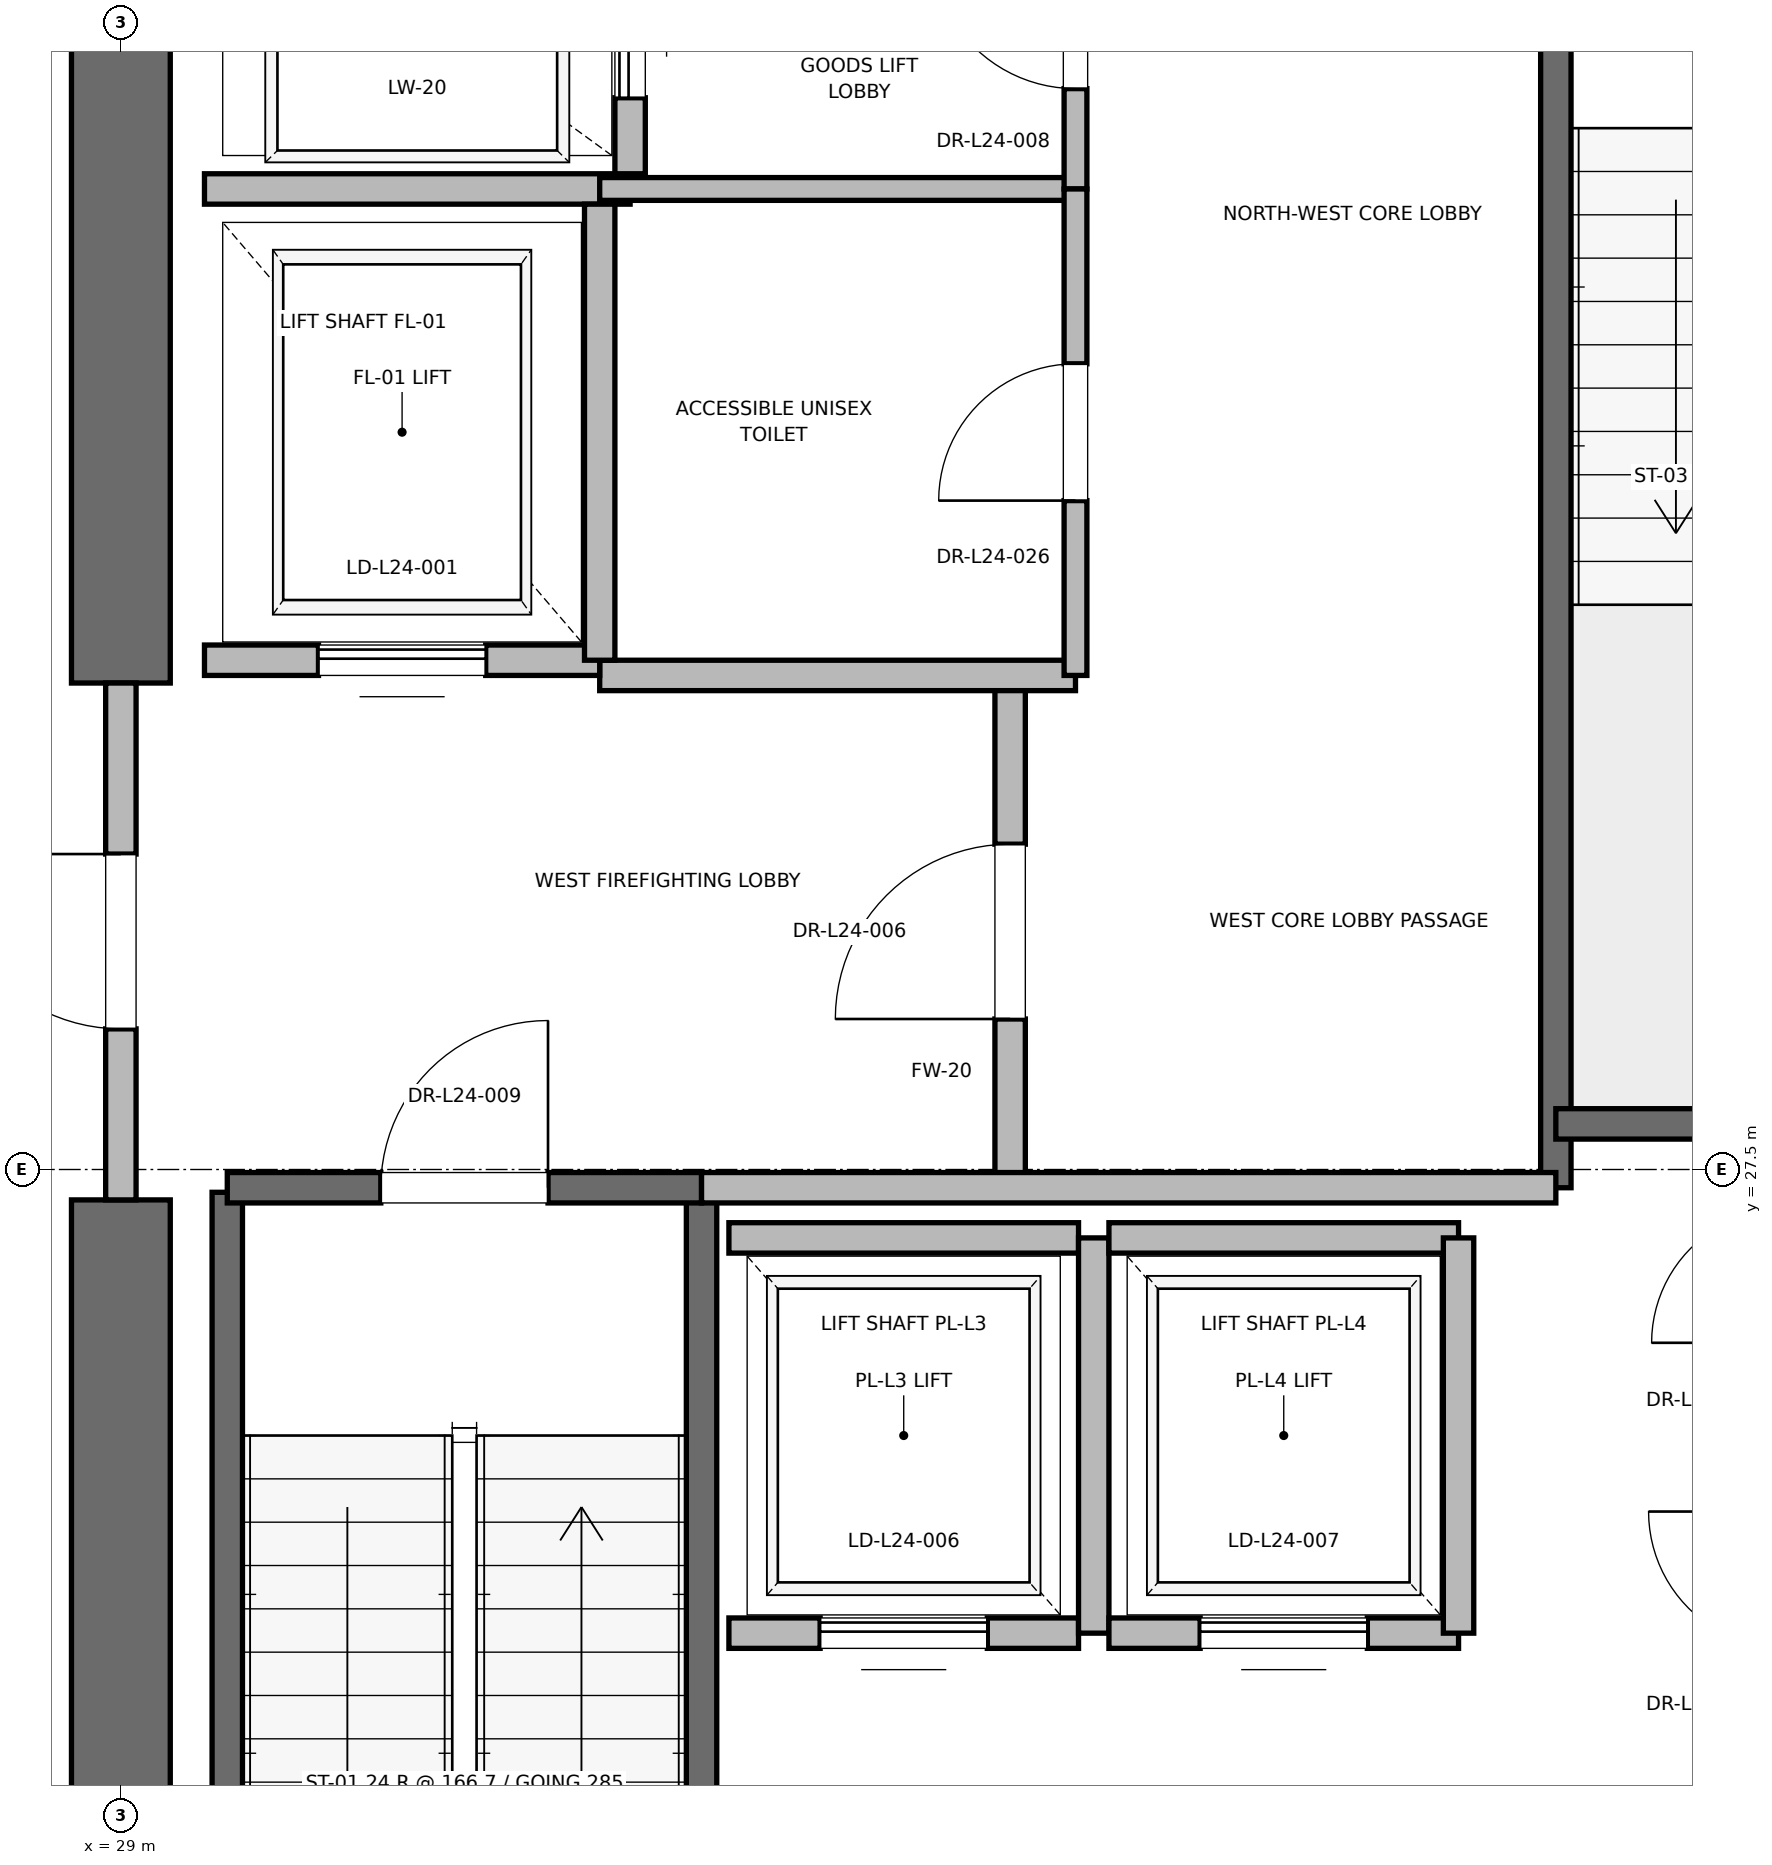
"""IFC4 building model, lengths in metres.
Left out: names, types, materials, properties, quantities, classifications, styles, units other than length and angle.
Written with IfcOpenShell. Run it as: python <this file> out.ifc"""

import sys

from ifc_helpers import new_model, si_unit, direction, frame, frame_2d, origin, place, context, subcontext, project, spatial, rectangle, extrude, element, fill, save


model = new_model("IFC4")
c1 = context("Model", 3, precision=1e-05, world=origin(), true_north=direction((0.0, 1.0)))
c2 = subcontext(c1, "Body", "Model", "MODEL_VIEW")
j1 = project(units=[si_unit("LENGTHUNIT", "METRE"), si_unit("PLANEANGLEUNIT", "RADIAN")], contexts=[c1])
p1 = place(None, origin())
s1 = spatial("IfcSite", under=j1, at=p1, CompositionType="ELEMENT")
p2 = place(p1, origin())
s2 = spatial("IfcBuilding", under=s1, at=p2, CompositionType="ELEMENT")
p3 = place(p2, frame((0.0, 0.0, 103.6)))
s3 = spatial("IfcBuildingStorey", under=s2, at=p3, CompositionType="ELEMENT", Elevation=103.6)
p4 = place(p3, frame((29.0, 18.5, 0.0), z_axis=(0.0, 0.0, 1.0), x_axis=(0.0, 1.0, 0.0)))
e1 = element("IfcWall", 1, at=p4, inside=s3, PredefinedType="SHEAR", context=c2, shape_type="SweptSolid", body=[
    extrude(rectangle(XDim=8.8, YDim=0.65, at=frame_2d((4.4, 0.0))), origin(), (0.0, 0.0, 1.0), 3.7),
])
p5 = place(p3, frame((29.0, 30.7, 0.0), z_axis=(0.0, 0.0, 1.0), x_axis=(0.0, 1.0, 0.0)))
e2 = element("IfcWall", 2, at=p5, inside=s3, PredefinedType="SHEAR", context=c2, shape_type="SweptSolid", body=[
    extrude(rectangle(XDim=5.8, YDim=0.65, at=frame_2d((2.9, 0.0))), origin(), (0.0, 0.0, 1.0), 3.7),
])
p6 = place(p3, frame((29.7, 19.2, 0.0), z_axis=(0.0, 0.0, 1.0), x_axis=(0.0, 1.0, 0.0)))
e3 = element("IfcWall", 3, at=p6, inside=s3, PredefinedType="SOLIDWALL", context=c2, shape_type="SweptSolid", body=[
    extrude(rectangle(XDim=8.15, YDim=0.2, at=frame_2d((4.075, 0.0))), origin(), (0.0, 0.0, 1.0), 3.7),
])
p7 = place(p3, frame((32.82, 18.6, 0.0), z_axis=(0.0, 0.0, 1.0), x_axis=(0.0, 1.0, 0.0)))
e4 = element("IfcWall", 4, at=p7, inside=s3, PredefinedType="SOLIDWALL", context=c2, shape_type="SweptSolid", body=[
    extrude(rectangle(XDim=8.78, YDim=0.2, at=frame_2d((4.39, 0.0))), origin(), (0.0, 0.0, 1.0), 3.7),
])
p8 = place(p3, frame((29.7, 27.38, 0.0), z_axis=(0.0, 0.0, 1.0), x_axis=(1.0, 0.0, 0.0)))
e5 = element("IfcWall", 5, at=p8, inside=s3, PredefinedType="SOLIDWALL", context=c2, shape_type="SweptSolid", body=[
    extrude(rectangle(XDim=3.12, YDim=0.2, at=frame_2d((1.56, 0.0))), origin(), (0.0, 0.0, 1.0), 3.7),
])
p9 = place(p8, frame((1.01, 0.0, 0.0)))
e6 = element("IfcOpeningElement", 6, at=p9, cuts=e5, PredefinedType="OPENING", context=c2, shape_type="SweptSolid", body=[
    extrude(rectangle(XDim=1.1, YDim=2.15, at=frame_2d((0.55, 1.075))), frame((0.0, 0.1, 0.0), z_axis=(0.0, -1.0, 0.0), x_axis=(1.0, 0.0, 0.0)), (0.0, 0.0, 1.0), 0.2),
])
p10 = place(p3, frame((38.44, 27.38, 0.0), z_axis=(0.0, 0.0, 1.0), x_axis=(0.0, 1.0, 0.0)))
e7 = element("IfcWall", 7, at=p10, inside=s3, PredefinedType="SOLIDWALL", context=c2, shape_type="SweptSolid", body=[
    extrude(rectangle(XDim=8.87, YDim=0.2, at=frame_2d((4.435, 0.0))), origin(), (0.0, 0.0, 1.0), 3.7),
])
p11 = place(p3, frame((38.44, 27.8, 0.0), z_axis=(0.0, 0.0, 1.0), x_axis=(1.0, 0.0, 0.0)))
e8 = element("IfcWall", 8, at=p11, inside=s3, PredefinedType="SOLIDWALL", context=c2, shape_type="SweptSolid", body=[
    extrude(rectangle(XDim=3.32, YDim=0.2, at=frame_2d((1.66, 0.0))), origin(), (0.0, 0.0, 1.0), 3.7),
])
p12 = place(p3, frame((34.85, 27.38, 0.0), z_axis=(0.0, 0.0, 1.0), x_axis=(0.0, 1.0, 0.0)))
e9 = element("IfcWall", 9, at=p12, inside=s3, PredefinedType="PARTITIONING", context=c2, shape_type="SweptSolid", body=[
    extrude(rectangle(XDim=3.37, YDim=0.2, at=frame_2d((1.685, 0.0))), origin(), (0.0, 0.0, 1.0), 3.7),
])
p13 = place(p12, frame((1.11, 0.0, 0.0)))
e10 = element("IfcOpeningElement", 10, at=p13, cuts=e9, PredefinedType="OPENING", context=c2, shape_type="SweptSolid", body=[
    extrude(rectangle(XDim=1.15, YDim=2.2, at=frame_2d((0.575, 1.1))), frame((0.0, 0.1, 0.0), z_axis=(0.0, -1.0, 0.0), x_axis=(1.0, 0.0, 0.0)), (0.0, 0.0, 1.0), 0.2),
])
p14 = place(p3, frame((29.0, 27.3, 0.0), z_axis=(0.0, 0.0, 1.0), x_axis=(0.0, 1.0, 0.0)))
e11 = element("IfcWall", 11, at=p14, inside=s3, PredefinedType="PARTITIONING", context=c2, shape_type="SweptSolid", body=[
    extrude(rectangle(XDim=3.4, YDim=0.2, at=frame_2d((1.7, 0.0))), origin(), (0.0, 0.0, 1.0), 2.48),
])
p15 = place(p14, frame((1.125, 0.0, 0.0)))
e12 = element("IfcOpeningElement", 12, at=p15, cuts=e11, PredefinedType="OPENING", context=c2, shape_type="SweptSolid", body=[
    extrude(rectangle(XDim=1.15, YDim=2.2, at=frame_2d((0.575, 1.1))), frame((0.0, 0.1, 0.0), z_axis=(0.0, -1.0, 0.0), x_axis=(1.0, 0.0, 0.0)), (0.0, 0.0, 1.0), 0.2),
])
p16 = place(p3, frame((32.82, 27.38, 0.0), z_axis=(0.0, 0.0, 1.0), x_axis=(1.0, 0.0, 0.0)))
e13 = element("IfcWall", 13, at=p16, inside=s3, PredefinedType="PARTITIONING", context=c2, shape_type="SweptSolid", body=[
    extrude(rectangle(XDim=5.62, YDim=0.2, at=frame_2d((2.81, 0.0))), origin(), (0.0, 0.0, 1.0), 3.7),
])
p17 = place(p3, frame((32.15, 30.75, 0.0), z_axis=(0.0, 0.0, 1.0), x_axis=(1.0, 0.0, 0.0)))
e14 = element("IfcWall", 14, at=p17, inside=s3, PredefinedType="PARTITIONING", context=c2, shape_type="SweptSolid", body=[
    extrude(rectangle(XDim=3.13, YDim=0.2, at=frame_2d((1.565, 0.0))), origin(), (0.0, 0.0, 1.0), 3.7),
])
p18 = place(p3, frame((29.55, 30.85, 0.0), z_axis=(0.0, 0.0, 1.0), x_axis=(1.0, 0.0, 0.0)))
e15 = element("IfcWall", 15, at=p18, inside=s3, PredefinedType="SOLIDWALL", context=c2, shape_type="SweptSolid", body=[
    extrude(rectangle(XDim=2.6, YDim=0.2, at=frame_2d((1.3, 0.0))), origin(), (0.0, 0.0, 1.0), 2.48),
])
p19 = place(p18, frame((0.75, 0.0, 0.0)))
e16 = element("IfcOpeningElement", 16, at=p19, cuts=e15, PredefinedType="OPENING", context=c2, shape_type="SweptSolid", body=[
    extrude(rectangle(XDim=1.1, YDim=2.2, at=frame_2d((0.55, 1.1))), frame((0.0, 0.1, 0.0), z_axis=(0.0, -1.0, 0.0), x_axis=(1.0, 0.0, 0.0)), (0.0, 0.0, 1.0), 0.2),
])
p20 = place(p3, frame((29.55, 33.95, 0.0), z_axis=(0.0, 0.0, 1.0), x_axis=(1.0, 0.0, 0.0)))
e17 = element("IfcWall", 17, at=p20, inside=s3, PredefinedType="SOLIDWALL", context=c2, shape_type="SweptSolid", body=[
    extrude(rectangle(XDim=2.8, YDim=0.2, at=frame_2d((1.4, 0.0))), origin(), (0.0, 0.0, 1.0), 3.7),
])
p21 = place(p3, frame((32.15, 30.85, 0.0), z_axis=(0.0, 0.0, 1.0), x_axis=(0.0, 1.0, 0.0)))
e18 = element("IfcWall", 18, at=p21, inside=s3, PredefinedType="SOLIDWALL", context=c2, shape_type="SweptSolid", body=[
    extrude(rectangle(XDim=3.0, YDim=0.2, at=frame_2d((1.5, 0.0))), origin(), (0.0, 0.0, 1.0), 3.7),
])
p22 = place(p3, frame((32.35, 34.05, 0.0), z_axis=(0.0, 0.0, 1.0), x_axis=(0.0, 1.0, 0.0)))
e19 = element("IfcWall", 19, at=p22, inside=s3, PredefinedType="SOLIDWALL", context=c2, shape_type="SweptSolid", body=[
    extrude(rectangle(XDim=2.1, YDim=0.2, at=frame_2d((1.05, 0.0))), origin(), (0.0, 0.0, 1.0), 3.7),
])
p23 = place(p22, frame((0.5, 0.0, 0.0)))
e20 = element("IfcOpeningElement", 20, at=p23, cuts=e19, PredefinedType="OPENING", context=c2, shape_type="SweptSolid", body=[
    extrude(rectangle(XDim=1.1, YDim=2.2, at=frame_2d((0.55, 1.1))), frame((0.0, 0.1, 0.0), z_axis=(0.0, -1.0, 0.0), x_axis=(1.0, 0.0, 0.0)), (0.0, 0.0, 1.0), 0.2),
])
p24 = place(p3, frame((33.0, 24.45, 0.0), z_axis=(0.0, 0.0, 1.0), x_axis=(1.0, 0.0, 0.0)))
e21 = element("IfcWall", 21, at=p24, inside=s3, PredefinedType="SOLIDWALL", context=c2, shape_type="SweptSolid", body=[
    extrude(rectangle(XDim=2.3, YDim=0.2, at=frame_2d((1.15, 0.0))), origin(), (0.0, 0.0, 1.0), 3.7),
])
p25 = place(p24, frame((0.6, 0.0, 0.0)))
e22 = element("IfcOpeningElement", 22, at=p25, cuts=e21, PredefinedType="OPENING", context=c2, shape_type="SweptSolid", body=[
    extrude(rectangle(XDim=1.1, YDim=2.2, at=frame_2d((0.55, 1.1))), frame((0.0, 0.1, 0.0), z_axis=(0.0, -1.0, 0.0), x_axis=(1.0, 0.0, 0.0)), (0.0, 0.0, 1.0), 0.2),
])
p26 = place(p3, frame((35.3, 27.05, 0.0), z_axis=(0.0, 0.0, 1.0), x_axis=(-1.0, 0.0, 0.0)))
e23 = element("IfcWall", 23, at=p26, inside=s3, PredefinedType="SOLIDWALL", context=c2, shape_type="SweptSolid", body=[
    extrude(rectangle(XDim=2.3, YDim=0.2, at=frame_2d((1.15, 0.0))), origin(), (0.0, 0.0, 1.0), 3.7),
])
p27 = place(p3, frame((35.4, 24.45, 0.0), z_axis=(0.0, 0.0, 1.0), x_axis=(0.0, 1.0, 0.0)))
e24 = element("IfcWall", 24, at=p27, inside=s3, PredefinedType="SOLIDWALL", context=c2, shape_type="SweptSolid", body=[
    extrude(rectangle(XDim=2.6, YDim=0.2, at=frame_2d((1.3, 0.0))), origin(), (0.0, 0.0, 1.0), 3.7),
])
p28 = place(p3, frame((35.5, 24.45, 0.0), z_axis=(0.0, 0.0, 1.0), x_axis=(1.0, 0.0, 0.0)))
e25 = element("IfcWall", 25, at=p28, inside=s3, PredefinedType="SOLIDWALL", context=c2, shape_type="SweptSolid", body=[
    extrude(rectangle(XDim=2.3, YDim=0.2, at=frame_2d((1.15, 0.0))), origin(), (0.0, 0.0, 1.0), 3.7),
])
p29 = place(p28, frame((0.6, 0.0, 0.0)))
e26 = element("IfcOpeningElement", 26, at=p29, cuts=e25, PredefinedType="OPENING", context=c2, shape_type="SweptSolid", body=[
    extrude(rectangle(XDim=1.1, YDim=2.2, at=frame_2d((0.55, 1.1))), frame((0.0, 0.1, 0.0), z_axis=(0.0, -1.0, 0.0), x_axis=(1.0, 0.0, 0.0)), (0.0, 0.0, 1.0), 0.2),
])
p30 = place(p3, frame((37.8, 27.05, 0.0), z_axis=(0.0, 0.0, 1.0), x_axis=(-1.0, 0.0, 0.0)))
e27 = element("IfcWall", 27, at=p30, inside=s3, PredefinedType="SOLIDWALL", context=c2, shape_type="SweptSolid", body=[
    extrude(rectangle(XDim=2.3, YDim=0.2, at=frame_2d((1.15, 0.0))), origin(), (0.0, 0.0, 1.0), 3.7),
])
p31 = place(p3, frame((37.8, 24.45, 0.0), z_axis=(0.0, 0.0, 1.0), x_axis=(0.0, 1.0, 0.0)))
e28 = element("IfcWall", 28, at=p31, inside=s3, PredefinedType="SOLIDWALL", context=c2, shape_type="SweptSolid", body=[
    extrude(rectangle(XDim=2.6, YDim=0.2, at=frame_2d((1.3, 0.0))), origin(), (0.0, 0.0, 1.0), 3.7),
])
p32 = place(p3, frame((32.15, 33.95, 0.0), z_axis=(0.0, 0.0, 1.0), x_axis=(1.0, 0.0, 0.0)))
e29 = element("IfcWall", 29, at=p32, inside=s3, PredefinedType="PARTITIONING", context=c2, shape_type="SweptSolid", body=[
    extrude(rectangle(XDim=3.13, YDim=0.15, at=frame_2d((1.565, 0.0))), origin(), (0.0, 0.0, 1.0), 2.85),
])
p33 = place(p3, frame((35.28, 33.95, 0.0), z_axis=(0.0, 0.0, 1.0), x_axis=(0.0, 1.0, 0.0)))
e30 = element("IfcWall", 30, at=p33, inside=s3, PredefinedType="PARTITIONING", context=c2, shape_type="SweptSolid", body=[
    extrude(rectangle(XDim=2.27, YDim=0.15, at=frame_2d((1.135, 0.0))), origin(), (0.0, 0.0, 1.0), 2.48),
])
p34 = place(p33, frame((0.66, 0.0, 0.0)))
e31 = element("IfcOpeningElement", 31, at=p34, cuts=e30, PredefinedType="OPENING", context=c2, shape_type="SweptSolid", body=[
    extrude(rectangle(XDim=0.95, YDim=2.15, at=frame_2d((0.475, 1.075))), frame((0.0, 0.075, 0.0), z_axis=(0.0, -1.0, 0.0), x_axis=(1.0, 0.0, 0.0)), (0.0, 0.0, 1.0), 0.15),
])
p35 = place(p3, frame((35.28, 30.75, 0.0), z_axis=(0.0, 0.0, 1.0), x_axis=(0.0, 1.0, 0.0)))
e32 = element("IfcWall", 32, at=p35, inside=s3, PredefinedType="PARTITIONING", context=c2, shape_type="SweptSolid", body=[
    extrude(rectangle(XDim=3.2, YDim=0.15, at=frame_2d((1.6, 0.0))), origin(), (0.0, 0.0, 1.0), 2.85),
])
p36 = place(p35, frame((1.15, 0.0, 0.0)))
e33 = element("IfcOpeningElement", 33, at=p36, cuts=e32, PredefinedType="OPENING", context=c2, shape_type="SweptSolid", body=[
    extrude(rectangle(XDim=0.9, YDim=2.1, at=frame_2d((0.45, 1.05))), frame((0.0, 0.075, 0.0), z_axis=(0.0, -1.0, 0.0), x_axis=(1.0, 0.0, 0.0)), (0.0, 0.0, 1.0), 0.15),
])
p37 = place(p9, origin())
e34 = element("IfcDoor", 34, at=p37, inside=s3, OperationType="SINGLE_SWING_RIGHT", PredefinedType="DOOR", context=c2, shape_type="SweptSolid", body=[
    extrude(rectangle(XDim=1.1, YDim=2.15, at=frame_2d((0.55, 1.075))), frame((0.0, 0.025, 0.0), z_axis=(0.0, -1.0, 0.0), x_axis=(1.0, 0.0, 0.0)), (0.0, 0.0, 1.0), 0.05),
])
fill(e6, e34)
p38 = place(p13, origin())
e35 = element("IfcDoor", 35, at=p38, inside=s3, OperationType="SINGLE_SWING_LEFT", PredefinedType="DOOR", context=c2, shape_type="SweptSolid", body=[
    extrude(rectangle(XDim=1.15, YDim=2.2, at=frame_2d((0.575, 1.1))), frame((0.0, 0.025, 0.0), z_axis=(0.0, -1.0, 0.0), x_axis=(1.0, 0.0, 0.0)), (0.0, 0.0, 1.0), 0.05),
])
fill(e10, e35)
p39 = place(p15, origin())
e36 = element("IfcDoor", 36, at=p39, inside=s3, OperationType="SINGLE_SWING_RIGHT", PredefinedType="DOOR", context=c2, shape_type="SweptSolid", body=[
    extrude(rectangle(XDim=1.15, YDim=2.2, at=frame_2d((0.575, 1.1))), frame((0.0, 0.025, 0.0), z_axis=(0.0, -1.0, 0.0), x_axis=(1.0, 0.0, 0.0)), (0.0, 0.0, 1.0), 0.05),
])
fill(e12, e36)
p40 = place(p19, origin())
e37 = element("IfcDoor", 37, at=p40, inside=s3, OperationType="SLIDING_TO_RIGHT", PredefinedType="DOOR", context=c2, shape_type="SweptSolid", body=[
    extrude(rectangle(XDim=1.1, YDim=2.2, at=frame_2d((0.55, 1.1))), frame((0.0, 0.025, 0.0), z_axis=(0.0, -1.0, 0.0), x_axis=(1.0, 0.0, 0.0)), (0.0, 0.0, 1.0), 0.05),
])
fill(e16, e37)
p41 = place(p23, origin())
e38 = element("IfcDoor", 38, at=p41, inside=s3, OperationType="SLIDING_TO_RIGHT", PredefinedType="DOOR", context=c2, shape_type="SweptSolid", body=[
    extrude(rectangle(XDim=1.1, YDim=2.2, at=frame_2d((0.55, 1.1))), frame((0.0, 0.025, 0.0), z_axis=(0.0, -1.0, 0.0), x_axis=(1.0, 0.0, 0.0)), (0.0, 0.0, 1.0), 0.05),
])
fill(e20, e38)
p42 = place(p25, origin())
e39 = element("IfcDoor", 39, at=p42, inside=s3, OperationType="SLIDING_TO_RIGHT", PredefinedType="DOOR", context=c2, shape_type="SweptSolid", body=[
    extrude(rectangle(XDim=1.1, YDim=2.2, at=frame_2d((0.55, 1.1))), frame((0.0, 0.025, 0.0), z_axis=(0.0, -1.0, 0.0), x_axis=(1.0, 0.0, 0.0)), (0.0, 0.0, 1.0), 0.05),
])
fill(e22, e39)
p43 = place(p29, origin())
e40 = element("IfcDoor", 40, at=p43, inside=s3, OperationType="SLIDING_TO_RIGHT", PredefinedType="DOOR", context=c2, shape_type="SweptSolid", body=[
    extrude(rectangle(XDim=1.1, YDim=2.2, at=frame_2d((0.55, 1.1))), frame((0.0, 0.025, 0.0), z_axis=(0.0, -1.0, 0.0), x_axis=(1.0, 0.0, 0.0)), (0.0, 0.0, 1.0), 0.05),
])
fill(e26, e40)
p44 = place(p34, origin())
e41 = element("IfcDoor", 41, at=p44, inside=s3, OperationType="SINGLE_SWING_RIGHT", PredefinedType="DOOR", context=c2, shape_type="SweptSolid", body=[
    extrude(rectangle(XDim=0.95, YDim=2.15, at=frame_2d((0.475, 1.075))), frame((0.0, 0.025, 0.0), z_axis=(0.0, -1.0, 0.0), x_axis=(1.0, 0.0, 0.0)), (0.0, 0.0, 1.0), 0.05),
])
fill(e31, e41)
p45 = place(p36, origin())
e42 = element("IfcDoor", 42, at=p45, inside=s3, OperationType="SINGLE_SWING_LEFT", PredefinedType="DOOR", context=c2, shape_type="SweptSolid", body=[
    extrude(rectangle(XDim=0.9, YDim=2.1, at=frame_2d((0.45, 1.05))), frame((0.0, 0.025, 0.0), z_axis=(0.0, -1.0, 0.0), x_axis=(1.0, 0.0, 0.0)), (0.0, 0.0, 1.0), 0.05),
])
fill(e33, e42)
save(model, sys.argv[1])
